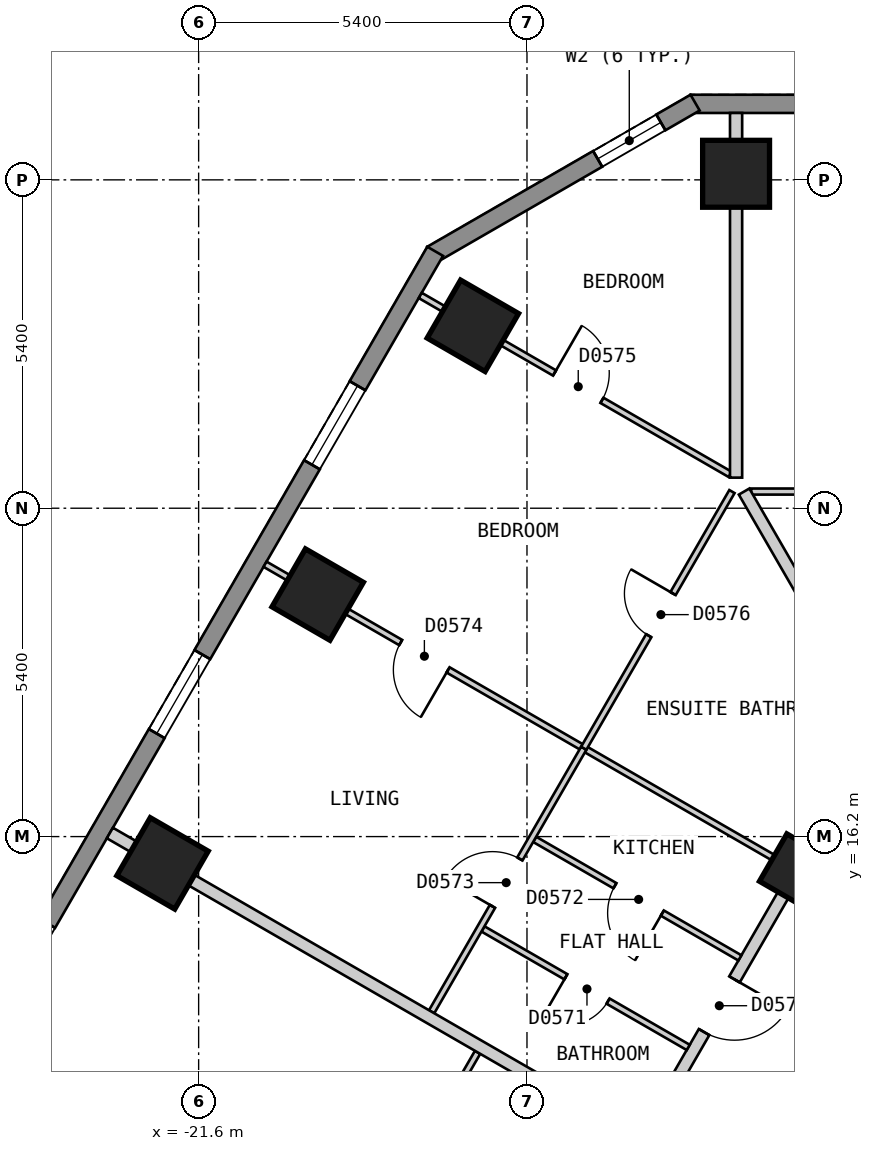
"""IFC4 building model, lengths in metres.
Left out: names, types, materials, properties, quantities, classifications, styles, units other than length and angle.
Written with IfcOpenShell. Run it as: python <this file> out.ifc"""

import sys

from ifc_helpers import new_model, si_unit, direction, frame, frame_2d, origin, origin_2d, place, context, subcontext, project, spatial, polyline, rectangle, outline, extrude, element, fill, save


model = new_model("IFC4")
c1 = context("Model", 3, precision=1e-05, world=origin(), true_north=direction((0.0, 1.0)))
c2 = subcontext(c1, "Body", "Model", "MODEL_VIEW")
j1 = project(units=[si_unit("LENGTHUNIT", "METRE"), si_unit("PLANEANGLEUNIT", "RADIAN")], contexts=[c1])
p1 = place(None, origin())
s1 = spatial("IfcSite", under=j1, at=p1, CompositionType="ELEMENT")
p2 = place(p1, origin())
s2 = spatial("IfcBuilding", under=s1, at=p2, CompositionType="ELEMENT")
p3 = place(p2, frame((0.0, 0.0, 56.4)))
s3 = spatial("IfcBuildingStorey", under=s2, at=p3, CompositionType="ELEMENT", Elevation=56.4)
for number, where, z_axis, x_axis in (
    (1, (-12.761, 27.1, 0.0), (0.0, 0.0, 1.0), (-1.0, 0.0, 0.0)),
    (2, (-17.09, 24.6, 0.0), (0.0, 0.0, 1.0), (-0.5, -0.866, 0.0)),
    (3, (-19.642, 20.18, 0.0), (0.0, 0.0, 1.0), (-0.5, -0.866, 0.0)),
    (4, (-22.194, 15.759, 0.0), (0.0, 0.0, 1.0), (-0.5, -0.866, 0.0)),
):
    element("IfcColumn", number, at=place(p3, frame(where, z_axis=z_axis, x_axis=x_axis)), inside=s3, PredefinedType="COLUMN", context=c2, shape_type="SweptSolid", body=[
        extrude(rectangle(XDim=1.1, YDim=1.1, at=origin_2d()), origin(), (0.0, 0.0, 1.0), 3.0),
    ])
p4 = place(p3, frame((-11.761, 15.63, 0.0), z_axis=(0.0, 0.0, 1.0), x_axis=(-0.499984884929, -0.866034130299, 0.0)))
e5 = element("IfcColumn", 5, at=p4, inside=s3, PredefinedType="COLUMN", context=c2, shape_type="SweptSolid", body=[
    extrude(rectangle(XDim=0.9, YDim=0.9, at=origin_2d()), origin(), (0.0, 0.0, 1.0), 3.0),
])
p5 = place(p3, frame((13.51, 28.25, 0.0), z_axis=(0.0, 0.0, 1.0), x_axis=(-1.0, 0.0, 0.0)))
e6 = element("IfcWall", 6, at=p5, inside=s3, PredefinedType="SOLIDWALL", context=c2, shape_type="SweptSolid", body=[
    extrude(outline(polyline([(0.0, -0.15), (27.02, -0.15), (26.94, 0.15), (0.08, 0.15), (0.0, -0.15)])), origin(), (0.0, 0.0, 1.0), 2.7),
])
p6 = place(p5, frame((2.553, 0.0, 0.15)))
e7 = element("IfcOpeningElement", 7, at=p6, cuts=e6, PredefinedType="OPENING", context=c2, shape_type="SweptSolid", body=[
    extrude(rectangle(XDim=1.5, YDim=2.1, at=frame_2d((0.75, 1.05))), frame((0.0, 0.16, 0.0), z_axis=(0.0, -1.0, 0.0), x_axis=(1.0, 0.0, 0.0)), (0.0, 0.0, 1.0), 0.32),
])
p7 = place(p5, frame((7.657, 0.0, 0.15)))
e8 = element("IfcOpeningElement", 8, at=p7, cuts=e6, PredefinedType="OPENING", context=c2, shape_type="SweptSolid", body=[
    extrude(rectangle(XDim=1.5, YDim=2.1, at=frame_2d((0.75, 1.05))), frame((0.0, 0.16, 0.0), z_axis=(0.0, -1.0, 0.0), x_axis=(1.0, 0.0, 0.0)), (0.0, 0.0, 1.0), 0.32),
])
p8 = place(p5, frame((12.761, 0.0, 0.15)))
e9 = element("IfcOpeningElement", 9, at=p8, cuts=e6, PredefinedType="OPENING", context=c2, shape_type="SweptSolid", body=[
    extrude(rectangle(XDim=1.5, YDim=2.1, at=frame_2d((0.75, 1.05))), frame((0.0, 0.16, 0.0), z_axis=(0.0, -1.0, 0.0), x_axis=(1.0, 0.0, 0.0)), (0.0, 0.0, 1.0), 0.32),
])
p9 = place(p5, frame((17.865, 0.0, 0.15)))
e10 = element("IfcOpeningElement", 10, at=p9, cuts=e6, PredefinedType="OPENING", context=c2, shape_type="SweptSolid", body=[
    extrude(rectangle(XDim=1.5, YDim=2.1, at=frame_2d((0.75, 1.05))), frame((0.0, 0.16, 0.0), z_axis=(0.0, -1.0, 0.0), x_axis=(1.0, 0.0, 0.0)), (0.0, 0.0, 1.0), 0.32),
])
p10 = place(p5, frame((22.969, 0.0, 0.15)))
e11 = element("IfcOpeningElement", 11, at=p10, cuts=e6, PredefinedType="OPENING", context=c2, shape_type="SweptSolid", body=[
    extrude(rectangle(XDim=1.5, YDim=2.1, at=frame_2d((0.75, 1.05))), frame((0.0, 0.16, 0.0), z_axis=(0.0, -1.0, 0.0), x_axis=(1.0, 0.0, 0.0)), (0.0, 0.0, 1.0), 0.32),
])
p11 = place(p3, frame((-13.435, 28.27, 0.0), z_axis=(0.0, 0.0, 1.0), x_axis=(-0.866010750942, -0.50002537861, 0.0)))
e12 = element("IfcWall", 12, at=p11, inside=s3, PredefinedType="SOLIDWALL", context=c2, shape_type="SweptSolid", body=[
    extrude(outline(polyline([(0.0, -0.15), (5.0, -0.15), (4.919, 0.15), (0.08, 0.15), (0.0, -0.15)])), origin(), (0.0, 0.0, 1.0), 2.7),
])
p12 = place(p11, frame((0.65, 0.0, 0.15)))
e13 = element("IfcOpeningElement", 13, at=p12, cuts=e12, PredefinedType="OPENING", context=c2, shape_type="SweptSolid", body=[
    extrude(rectangle(XDim=1.2, YDim=2.1, at=frame_2d((0.6, 1.05))), frame((0.0, 0.16, 0.0), z_axis=(0.0, -1.0, 0.0), x_axis=(1.0, 0.0, 0.0)), (0.0, 0.0, 1.0), 0.32),
])
p13 = place(p3, frame((-17.71, 25.825, 0.0), z_axis=(0.0, 0.0, 1.0), x_axis=(-0.500001938803, -0.866024284413, 0.0)))
e14 = element("IfcWall", 14, at=p13, inside=s3, PredefinedType="SOLIDWALL", context=c2, shape_type="SweptSolid", body=[
    extrude(outline(polyline([(0.0, -0.15), (27.02, -0.15), (26.94, 0.15), (0.08, 0.15), (0.0, -0.15)])), origin(), (0.0, 0.0, 1.0), 2.7),
])
p14 = place(p13, frame((2.553, 0.0, 0.15)))
e15 = element("IfcOpeningElement", 15, at=p14, cuts=e14, PredefinedType="OPENING", context=c2, shape_type="SweptSolid", body=[
    extrude(rectangle(XDim=1.5, YDim=2.1, at=frame_2d((0.75, 1.05))), frame((0.0, 0.16, 0.0), z_axis=(0.0, -1.0, 0.0), x_axis=(1.0, 0.0, 0.0)), (0.0, 0.0, 1.0), 0.32),
])
p15 = place(p13, frame((7.658, 0.0, 0.15)))
e16 = element("IfcOpeningElement", 16, at=p15, cuts=e14, PredefinedType="OPENING", context=c2, shape_type="SweptSolid", body=[
    extrude(rectangle(XDim=1.5, YDim=2.1, at=frame_2d((0.75, 1.05))), frame((0.0, 0.16, 0.0), z_axis=(0.0, -1.0, 0.0), x_axis=(1.0, 0.0, 0.0)), (0.0, 0.0, 1.0), 0.32),
])
p16 = place(p13, frame((12.761, 0.0, 0.15)))
e17 = element("IfcOpeningElement", 17, at=p16, cuts=e14, PredefinedType="OPENING", context=c2, shape_type="SweptSolid", body=[
    extrude(rectangle(XDim=1.5, YDim=2.1, at=frame_2d((0.75, 1.05))), frame((0.0, 0.16, 0.0), z_axis=(0.0, -1.0, 0.0), x_axis=(1.0, 0.0, 0.0)), (0.0, 0.0, 1.0), 0.32),
])
p17 = place(p13, frame((17.865, 0.0, 0.15)))
e18 = element("IfcOpeningElement", 18, at=p17, cuts=e14, PredefinedType="OPENING", context=c2, shape_type="SweptSolid", body=[
    extrude(rectangle(XDim=1.5, YDim=2.1, at=frame_2d((0.75, 1.05))), frame((0.0, 0.16, 0.0), z_axis=(0.0, -1.0, 0.0), x_axis=(1.0, 0.0, 0.0)), (0.0, 0.0, 1.0), 0.32),
])
p18 = place(p13, frame((22.969, 0.0, 0.15)))
e19 = element("IfcOpeningElement", 19, at=p18, cuts=e14, PredefinedType="OPENING", context=c2, shape_type="SweptSolid", body=[
    extrude(rectangle(XDim=1.5, YDim=2.1, at=frame_2d((0.75, 1.05))), frame((0.0, 0.16, 0.0), z_axis=(0.0, -1.0, 0.0), x_axis=(1.0, 0.0, 0.0)), (0.0, 0.0, 1.0), 0.32),
])
p19 = place(p3, frame((-18.244, -0.001, 0.0), z_axis=(0.0, 0.0, 1.0), x_axis=(0.499962999376, 0.866046765051, 0.0)))
e20 = element("IfcWall", 20, at=p19, inside=s3, PredefinedType="PARTITIONING", context=c2, shape_type="SweptSolid", body=[
    extrude(rectangle(XDim=18.245, YDim=0.2, at=frame_2d((9.123, 0.0))), origin(), (0.0, 0.0, 1.0), 2.7),
])
p20 = place(p19, frame((8.672, 0.0, 0.0)))
e21 = element("IfcOpeningElement", 21, at=p20, cuts=e20, PredefinedType="OPENING", context=c2, shape_type="SweptSolid", body=[
    extrude(rectangle(XDim=0.9, YDim=2.1, at=frame_2d((0.45, 1.05))), frame((0.0, 0.11, 0.0), z_axis=(0.0, -1.0, 0.0), x_axis=(1.0, 0.0, 0.0)), (0.0, 0.0, 1.0), 0.22),
])
p21 = place(p3, frame((-20.727, 0.099, 0.0), z_axis=(0.0, 0.0, 1.0), x_axis=(0.499993204491, 0.866029327138, 0.0)))
e22 = element("IfcWall", 22, at=p21, inside=s3, PredefinedType="PARTITIONING", context=c2, shape_type="SweptSolid", body=[
    extrude(rectangle(XDim=20.554, YDim=0.2, at=frame_2d((10.277, 0.0))), origin(), (0.0, 0.0, 1.0), 2.7),
])
p22 = place(p21, frame((9.776, 0.0, 0.0)))
e23 = element("IfcOpeningElement", 23, at=p22, cuts=e22, PredefinedType="OPENING", context=c2, shape_type="SweptSolid", body=[
    extrude(rectangle(XDim=1.0, YDim=2.1, at=frame_2d((0.5, 1.05))), frame((0.0, 0.11, 0.0), z_axis=(0.0, -1.0, 0.0), x_axis=(1.0, 0.0, 0.0)), (0.0, 0.0, 1.0), 0.22),
])
p23 = place(p21, frame((4.673, 0.0, 0.0)))
e24 = element("IfcOpeningElement", 24, at=p23, cuts=e22, PredefinedType="OPENING", context=c2, shape_type="SweptSolid", body=[
    extrude(rectangle(XDim=1.0, YDim=2.1, at=frame_2d((0.5, 1.05))), frame((0.0, 0.11, 0.0), z_axis=(0.0, -1.0, 0.0), x_axis=(1.0, 0.0, 0.0)), (0.0, 0.0, 1.0), 0.22),
])
p24 = place(p21, frame((14.88, 0.0, 0.0)))
e25 = element("IfcOpeningElement", 25, at=p24, cuts=e22, PredefinedType="OPENING", context=c2, shape_type="SweptSolid", body=[
    extrude(rectangle(XDim=1.0, YDim=2.1, at=frame_2d((0.5, 1.05))), frame((0.0, 0.11, 0.0), z_axis=(0.0, -1.0, 0.0), x_axis=(1.0, 0.0, 0.0)), (0.0, 0.0, 1.0), 0.22),
])
p25 = place(p3, frame((-16.923, 14.681, 0.0), z_axis=(0.0, 0.0, 1.0), x_axis=(0.866087525071, -0.499892387336, 0.0)))
e26 = element("IfcWall", 26, at=p25, inside=s3, PredefinedType="PARTITIONING", context=c2, shape_type="SweptSolid", body=[
    extrude(rectangle(XDim=3.897, YDim=0.1, at=frame_2d((1.948, 0.0))), origin(), (0.0, 0.0, 1.0), 2.7),
])
p26 = place(p25, frame((1.574, 0.0, 0.0)))
e27 = element("IfcOpeningElement", 27, at=p26, cuts=e26, PredefinedType="OPENING", context=c2, shape_type="SweptSolid", body=[
    extrude(rectangle(XDim=0.8, YDim=2.1, at=frame_2d((0.4, 1.05))), frame((0.0, 0.06, 0.0), z_axis=(0.0, -1.0, 0.0), x_axis=(1.0, 0.0, 0.0)), (0.0, 0.0, 1.0), 0.12),
])
p27 = place(p3, frame((-16.073, 16.154, 0.0), z_axis=(0.0, 0.0, 1.0), x_axis=(0.865979019114, -0.500080332001, 0.0)))
e28 = element("IfcWall", 28, at=p27, inside=s3, PredefinedType="PARTITIONING", context=c2, shape_type="SweptSolid", body=[
    extrude(rectangle(XDim=3.897, YDim=0.1, at=frame_2d((1.949, 0.0))), origin(), (0.0, 0.0, 1.0), 2.7),
])
p28 = place(p27, frame((1.524, 0.0, 0.0)))
e29 = element("IfcOpeningElement", 29, at=p28, cuts=e28, PredefinedType="OPENING", context=c2, shape_type="SweptSolid", body=[
    extrude(rectangle(XDim=0.9, YDim=2.1, at=frame_2d((0.45, 1.05))), frame((0.0, 0.06, 0.0), z_axis=(0.0, -1.0, 0.0), x_axis=(1.0, 0.0, 0.0)), (0.0, 0.0, 1.0), 0.12),
])
p29 = place(p3, frame((-20.508, 20.679, 0.0), z_axis=(0.0, 0.0, 1.0), x_axis=(0.866047370643, -0.499961950354, 0.0)))
e30 = element("IfcWall", 30, at=p29, inside=s3, PredefinedType="PARTITIONING", context=c2, shape_type="SweptSolid", body=[
    extrude(rectangle(XDim=10.001, YDim=0.1, at=frame_2d((5.0, 0.0))), origin(), (0.0, 0.0, 1.0), 2.7),
])
p30 = place(p29, frame((2.576, 0.0, 0.0)))
e31 = element("IfcOpeningElement", 31, at=p30, cuts=e30, PredefinedType="OPENING", context=c2, shape_type="SweptSolid", body=[
    extrude(rectangle(XDim=0.9, YDim=2.1, at=frame_2d((0.45, 1.05))), frame((0.0, 0.06, 0.0), z_axis=(0.0, -1.0, 0.0), x_axis=(1.0, 0.0, 0.0)), (0.0, 0.0, 1.0), 0.12),
])
p31 = place(p3, frame((-17.955, 25.099, 0.0), z_axis=(0.0, 0.0, 1.0), x_axis=(0.866036353684, -0.499981033738, 0.0)))
e32 = element("IfcWall", 32, at=p31, inside=s3, PredefinedType="PARTITIONING", context=c2, shape_type="SweptSolid", body=[
    extrude(rectangle(XDim=5.885, YDim=0.1, at=frame_2d((2.942, 0.0))), origin(), (0.0, 0.0, 1.0), 2.7),
])
p32 = place(p31, frame((2.55, 0.0, 0.0)))
e33 = element("IfcOpeningElement", 33, at=p32, cuts=e32, PredefinedType="OPENING", context=c2, shape_type="SweptSolid", body=[
    extrude(rectangle(XDim=0.9, YDim=2.1, at=frame_2d((0.45, 1.05))), frame((0.0, 0.06, 0.0), z_axis=(0.0, -1.0, 0.0), x_axis=(1.0, 0.0, 0.0)), (0.0, 0.0, 1.0), 0.12),
])
p33 = place(p3, frame((-12.513, 21.874, 0.0), z_axis=(0.0, 0.0, 1.0), x_axis=(1.0, 0.0, 0.0)))
e34 = element("IfcWall", 34, at=p33, inside=s3, PredefinedType="PARTITIONING", context=c2, shape_type="SweptSolid", body=[
    extrude(rectangle(XDim=4.806, YDim=0.1, at=frame_2d((2.403, 0.0))), origin(), (0.0, 0.0, 1.0), 2.7),
])
p34 = place(p33, frame((1.97, 0.0, 0.0)))
e35 = element("IfcOpeningElement", 35, at=p34, cuts=e34, PredefinedType="OPENING", context=c2, shape_type="SweptSolid", body=[
    extrude(rectangle(XDim=0.8, YDim=2.1, at=frame_2d((0.4, 1.05))), frame((0.0, 0.06, 0.0), z_axis=(0.0, -1.0, 0.0), x_axis=(1.0, 0.0, 0.0)), (0.0, 0.0, 1.0), 0.12),
])
p35 = place(p3, frame((-18.621, 9.867, 0.0), z_axis=(0.0, 0.0, 1.0), x_axis=(0.500197891286, 0.865911121047, 0.0)))
e36 = element("IfcWall", 36, at=p35, inside=s3, PredefinedType="PARTITIONING", context=c2, shape_type="SweptSolid", body=[
    extrude(rectangle(XDim=3.215, YDim=0.1, at=frame_2d((1.607, 0.0))), origin(), (0.0, 0.0, 1.0), 2.7),
])
p36 = place(p3, frame((-17.768, 13.319, 0.0), z_axis=(0.0, 0.0, 1.0), x_axis=(0.499958946799, 0.866049104564, 0.0)))
e37 = element("IfcWall", 37, at=p36, inside=s3, PredefinedType="PARTITIONING", context=c2, shape_type="SweptSolid", body=[
    extrude(rectangle(XDim=5.004, YDim=0.1, at=frame_2d((2.502, 0.0))), origin(), (0.0, 0.0, 1.0), 2.7),
])
p37 = place(p36, frame((2.002, 0.0, 0.0)))
e38 = element("IfcOpeningElement", 38, at=p37, cuts=e37, PredefinedType="OPENING", context=c2, shape_type="SweptSolid", body=[
    extrude(rectangle(XDim=0.9, YDim=2.1, at=frame_2d((0.45, 1.05))), frame((0.0, 0.06, 0.0), z_axis=(0.0, -1.0, 0.0), x_axis=(1.0, 0.0, 0.0)), (0.0, 0.0, 1.0), 0.12),
])
p38 = place(p3, frame((-12.629, 21.874, 0.0), z_axis=(0.0, 0.0, 1.0), x_axis=(0.500024801635, -0.86601108408, 0.0)))
e39 = element("IfcWall", 39, at=p38, inside=s3, PredefinedType="PARTITIONING", context=c2, shape_type="SweptSolid", body=[
    extrude(rectangle(XDim=4.473, YDim=0.2, at=frame_2d((2.237, 0.0))), origin(), (0.0, 0.0, 1.0), 2.7),
])
p39 = place(p3, frame((-23.06, 16.259, 0.0), z_axis=(0.0, 0.0, 1.0), x_axis=(0.866047370643, -0.499961950354, 0.0)))
e40 = element("IfcWall", 40, at=p39, inside=s3, PredefinedType="PARTITIONING", context=c2, shape_type="SweptSolid", body=[
    extrude(rectangle(XDim=10.001, YDim=0.2, at=frame_2d((5.0, 0.0))), origin(), (0.0, 0.0, 1.0), 2.7),
])
p40 = place(p3, frame((-12.761, 22.103, 0.0), z_axis=(0.0, 0.0, 1.0), x_axis=(0.0, 1.0, 0.0)))
e41 = element("IfcWall", 41, at=p40, inside=s3, PredefinedType="PARTITIONING", context=c2, shape_type="SweptSolid", body=[
    extrude(rectangle(XDim=5.997, YDim=0.2, at=frame_2d((2.999, 0.0))), origin(), (0.0, 0.0, 1.0), 2.7),
])
p41 = place(p3, frame((-15.266, 17.653, 0.0), z_axis=(0.0, 0.0, 1.0), x_axis=(0.500007182864, 0.866021256716, 0.0)))
e42 = element("IfcWall", 42, at=p41, inside=s3, PredefinedType="PARTITIONING", context=c2, shape_type="SweptSolid", body=[
    extrude(rectangle(XDim=4.874, YDim=0.1, at=frame_2d((2.437, 0.0))), origin(), (0.0, 0.0, 1.0), 2.7),
])
p42 = place(p41, frame((2.137, 0.0, 0.0)))
e43 = element("IfcOpeningElement", 43, at=p42, cuts=e42, PredefinedType="OPENING", context=c2, shape_type="SweptSolid", body=[
    extrude(rectangle(XDim=0.8, YDim=2.1, at=frame_2d((0.4, 1.05))), frame((0.0, 0.06, 0.0), z_axis=(0.0, -1.0, 0.0), x_axis=(1.0, 0.0, 0.0)), (0.0, 0.0, 1.0), 0.12),
])
p43 = place(p12, origin())
e44 = element("IfcWindow", 44, at=p43, inside=s3, PartitioningType="SINGLE_PANEL", PredefinedType="WINDOW", context=c2, shape_type="SweptSolid", body=[
    extrude(rectangle(XDim=1.2, YDim=2.1, at=frame_2d((0.6, 1.05))), frame((0.0, 0.03, 0.0), z_axis=(0.0, -1.0, 0.0), x_axis=(1.0, 0.0, 0.0)), (0.0, 0.0, 1.0), 0.06),
])
fill(e13, e44)
p44 = place(p14, origin())
e45 = element("IfcWindow", 45, at=p44, inside=s3, PartitioningType="SINGLE_PANEL", PredefinedType="WINDOW", context=c2, shape_type="SweptSolid", body=[
    extrude(rectangle(XDim=1.5, YDim=2.1, at=frame_2d((0.75, 1.05))), frame((0.0, 0.03, 0.0), z_axis=(0.0, -1.0, 0.0), x_axis=(1.0, 0.0, 0.0)), (0.0, 0.0, 1.0), 0.06),
])
fill(e15, e45)
p45 = place(p15, origin())
e46 = element("IfcWindow", 46, at=p45, inside=s3, PartitioningType="SINGLE_PANEL", PredefinedType="WINDOW", context=c2, shape_type="SweptSolid", body=[
    extrude(rectangle(XDim=1.5, YDim=2.1, at=frame_2d((0.75, 1.05))), frame((0.0, 0.03, 0.0), z_axis=(0.0, -1.0, 0.0), x_axis=(1.0, 0.0, 0.0)), (0.0, 0.0, 1.0), 0.06),
])
fill(e16, e46)
p46 = place(p24, origin())
e47 = element("IfcDoor", 47, at=p46, inside=s3, OperationType="SINGLE_SWING_RIGHT", PredefinedType="DOOR", context=c2, shape_type="SweptSolid", body=[
    extrude(rectangle(XDim=1.0, YDim=2.1, at=frame_2d((0.5, 1.05))), frame((0.0, 0.025, 0.0), z_axis=(0.0, -1.0, 0.0), x_axis=(1.0, 0.0, 0.0)), (0.0, 0.0, 1.0), 0.05),
])
fill(e25, e47)
p47 = place(p26, origin())
e48 = element("IfcDoor", 48, at=p47, inside=s3, OperationType="SINGLE_SWING_LEFT", PredefinedType="DOOR", context=c2, shape_type="SweptSolid", body=[
    extrude(rectangle(XDim=0.8, YDim=2.1, at=frame_2d((0.4, 1.05))), frame((0.0, 0.025, 0.0), z_axis=(0.0, -1.0, 0.0), x_axis=(1.0, 0.0, 0.0)), (0.0, 0.0, 1.0), 0.05),
])
fill(e27, e48)
p48 = place(p28, origin())
e49 = element("IfcDoor", 49, at=p48, inside=s3, OperationType="SINGLE_SWING_RIGHT", PredefinedType="DOOR", context=c2, shape_type="SweptSolid", body=[
    extrude(rectangle(XDim=0.9, YDim=2.1, at=frame_2d((0.45, 1.05))), frame((0.0, 0.025, 0.0), z_axis=(0.0, -1.0, 0.0), x_axis=(1.0, 0.0, 0.0)), (0.0, 0.0, 1.0), 0.05),
])
fill(e29, e49)
p49 = place(p37, origin())
e50 = element("IfcDoor", 50, at=p49, inside=s3, OperationType="SINGLE_SWING_LEFT", PredefinedType="DOOR", context=c2, shape_type="SweptSolid", body=[
    extrude(rectangle(XDim=0.9, YDim=2.1, at=frame_2d((0.45, 1.05))), frame((0.0, 0.025, 0.0), z_axis=(0.0, -1.0, 0.0), x_axis=(1.0, 0.0, 0.0)), (0.0, 0.0, 1.0), 0.05),
])
fill(e38, e50)
p50 = place(p30, origin())
e51 = element("IfcDoor", 51, at=p50, inside=s3, OperationType="SINGLE_SWING_RIGHT", PredefinedType="DOOR", context=c2, shape_type="SweptSolid", body=[
    extrude(rectangle(XDim=0.9, YDim=2.1, at=frame_2d((0.45, 1.05))), frame((0.0, 0.025, 0.0), z_axis=(0.0, -1.0, 0.0), x_axis=(1.0, 0.0, 0.0)), (0.0, 0.0, 1.0), 0.05),
])
fill(e31, e51)
p51 = place(p32, origin())
e52 = element("IfcDoor", 52, at=p51, inside=s3, OperationType="SINGLE_SWING_LEFT", PredefinedType="DOOR", context=c2, shape_type="SweptSolid", body=[
    extrude(rectangle(XDim=0.9, YDim=2.1, at=frame_2d((0.45, 1.05))), frame((0.0, 0.025, 0.0), z_axis=(0.0, -1.0, 0.0), x_axis=(1.0, 0.0, 0.0)), (0.0, 0.0, 1.0), 0.05),
])
fill(e33, e52)
p52 = place(p42, origin())
e53 = element("IfcDoor", 53, at=p52, inside=s3, OperationType="SINGLE_SWING_RIGHT", PredefinedType="DOOR", context=c2, shape_type="SweptSolid", body=[
    extrude(rectangle(XDim=0.8, YDim=2.1, at=frame_2d((0.4, 1.05))), frame((0.0, 0.025, 0.0), z_axis=(0.0, -1.0, 0.0), x_axis=(1.0, 0.0, 0.0)), (0.0, 0.0, 1.0), 0.05),
])
fill(e43, e53)
save(model, sys.argv[1])
